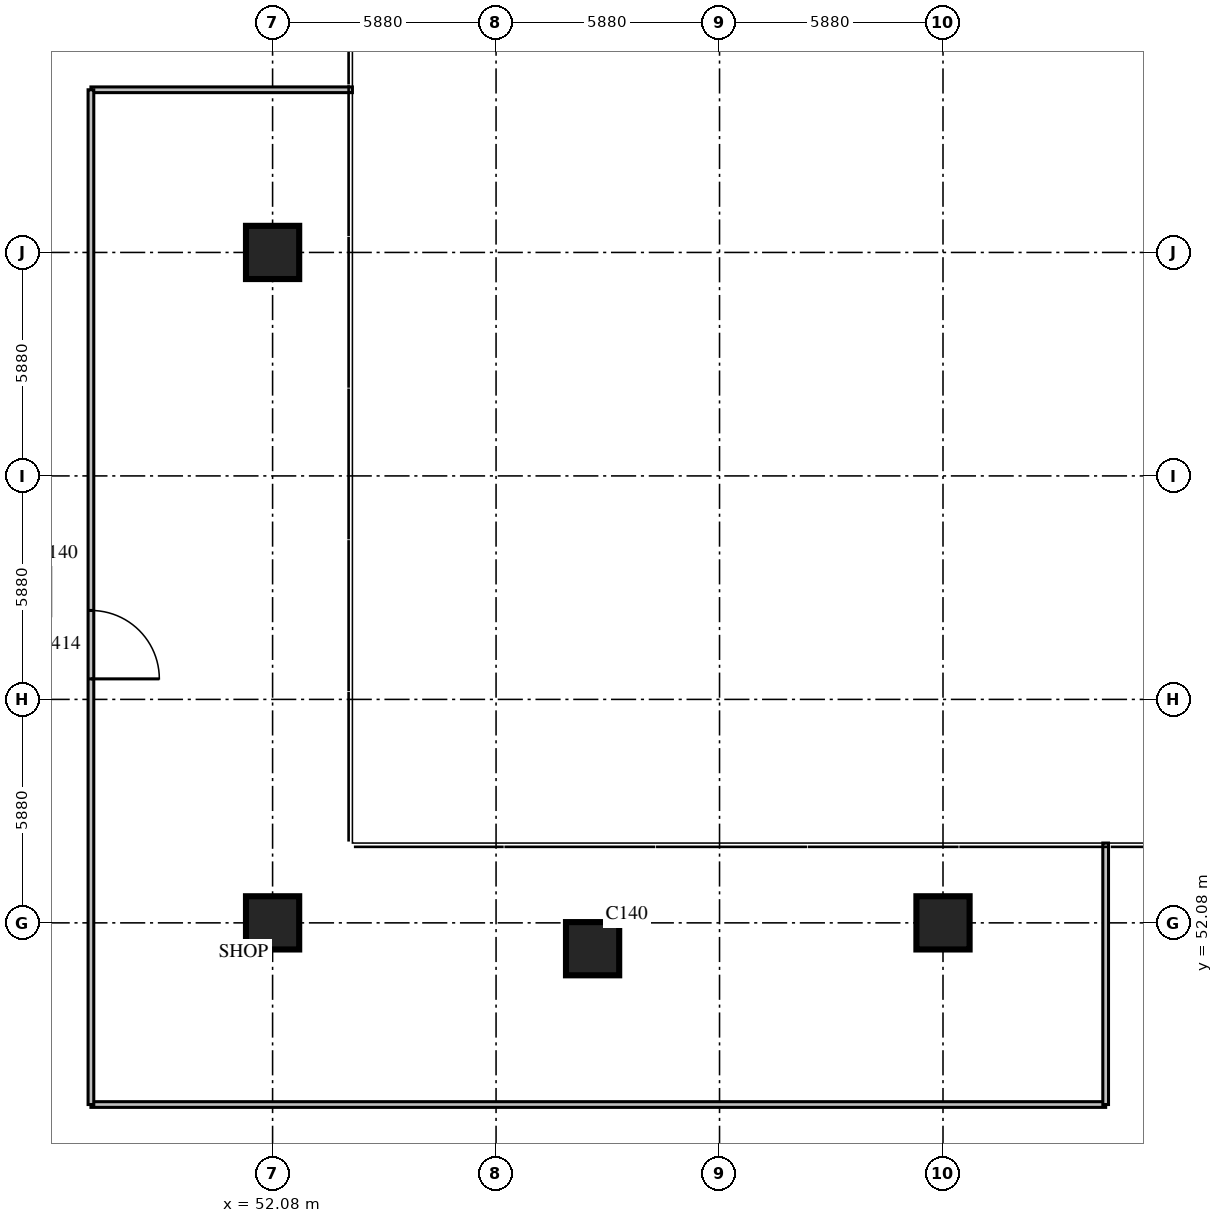
"""IFC4 building model, lengths in metres.
Left out: names, types, materials, properties, quantities, classifications, styles, units other than length and angle.
Written with IfcOpenShell. Run it as: python <this file> out.ifc"""

import sys

from ifc_helpers import new_model, si_unit, direction, frame, frame_2d, origin, origin_2d, place, context, subcontext, project, spatial, rectangle, extrude, source, transform, mapped, element, fill, save


model = new_model("IFC4")
c1 = context("Model", 3, precision=1e-05, world=origin(), true_north=direction((0.0, 1.0)))
c2 = subcontext(c1, "Body", "Model", "MODEL_VIEW")
j1 = project(units=[si_unit("LENGTHUNIT", "METRE"), si_unit("PLANEANGLEUNIT", "RADIAN")], contexts=[c1])
p1 = place(None, origin())
s1 = spatial("IfcSite", under=j1, at=p1, CompositionType="ELEMENT")
p2 = place(p1, origin())
s2 = spatial("IfcBuilding", under=s1, at=p2, CompositionType="ELEMENT")
p3 = place(p2, frame((0.0, 0.0, 7.5)))
s3 = spatial("IfcBuildingStorey", under=s2, at=p3, CompositionType="ELEMENT", Elevation=7.5)
m1 = source(origin(), c2, "Body", "SweptSolid", [
    extrude(rectangle(XDim=1.4, YDim=1.4, at=origin_2d()), origin(), (0.0, 0.0, 1.0), 5.4),
])
for number, where, z_axis, x_axis in (
    (1, (52.08, 52.08, 0.0), (0.0, 0.0, 1.0), (1.0, 0.0, 0.0)),
    (2, (52.08, 69.72, 0.0), (0.0, 0.0, 1.0), (1.0, 0.0, 0.0)),
    (3, (60.5, 51.4, 0.0), (0.0, 0.0, 1.0), (1.0, 0.0, 0.0)),
    (4, (69.72, 52.08, 0.0), (0.0, 0.0, 1.0), (1.0, 0.0, 0.0)),
):
    element("IfcColumn", number, at=place(p3, frame(where, z_axis=z_axis, x_axis=x_axis)), inside=s3, PredefinedType="COLUMN", context=c2, shape_type="MappedRepresentation", body=[
        mapped(m1, transform((0.0, 0.0, 0.0), scale=1.0)),
    ])
m2 = source(origin(), c2, "Body", "SweptSolid", [
    extrude(rectangle(XDim=26.7, YDim=0.15, at=frame_2d((13.35, 0.0))), origin(), (0.0, 0.0, 1.0), 4.8),
])
p4 = place(p3, frame((47.3, 47.3, 0.0), z_axis=(0.0, 0.0, 1.0), x_axis=(1.0, 0.0, 0.0)))
e5 = element("IfcWall", 5, at=p4, inside=s3, PredefinedType="PARTITIONING", context=c2, shape_type="MappedRepresentation", body=[
    mapped(m2, transform((0.0, 0.0, 0.0), scale=1.0)),
])
p5 = place(p3, frame((47.3, 74.0, 0.0), z_axis=(0.0, 0.0, 1.0), x_axis=(1.0, 0.0, 0.0)))
e6 = element("IfcWall", 6, at=p5, inside=s3, PredefinedType="PARTITIONING", context=c2, shape_type="SweptSolid", body=[
    extrude(rectangle(XDim=6.88, YDim=0.15, at=frame_2d((3.44, 0.0))), origin(), (0.0, 0.0, 1.0), 4.8),
])
p6 = place(p3, frame((47.3, 47.3, 0.0), z_axis=(0.0, 0.0, 1.0), x_axis=(0.0, 1.0, 0.0)))
e7 = element("IfcWall", 7, at=p6, inside=s3, PredefinedType="PARTITIONING", context=c2, shape_type="MappedRepresentation", body=[
    mapped(m2, transform((0.0, 0.0, 0.0), scale=1.0)),
])
m3 = source(origin(), c2, "Body", "SweptSolid", [
    extrude(rectangle(XDim=1.8, YDim=2.1, at=frame_2d((0.9, 1.05))), frame((0.0, 0.085, 0.0), z_axis=(0.0, -1.0, 0.0), x_axis=(1.0, 0.0, 0.0)), (0.0, 0.0, 1.0), 0.17),
])
p7 = place(p6, frame((11.2, 0.0, 0.0)))
e8 = element("IfcOpeningElement", 8, at=p7, cuts=e7, PredefinedType="OPENING", context=c2, shape_type="MappedRepresentation", body=[
    mapped(m3, transform((0.0, 0.0, 0.0), scale=1.0)),
])
m4 = source(origin(), c2, "Body", "SweptSolid", [
    extrude(rectangle(XDim=6.88, YDim=0.15, at=frame_2d((3.44, 0.0))), origin(), (0.0, 0.0, 1.0), 4.8),
])
p8 = place(p3, frame((74.0, 47.3, 0.0), z_axis=(0.0, 0.0, 1.0), x_axis=(0.0, 1.0, 0.0)))
e9 = element("IfcWall", 9, at=p8, inside=s3, PredefinedType="PARTITIONING", context=c2, shape_type="MappedRepresentation", body=[
    mapped(m4, transform((0.0, 0.0, 0.0), scale=1.0)),
])
m5 = source(origin(), c2, "Body", "SweptSolid", [
    extrude(rectangle(XDim=1.8, YDim=2.1, at=frame_2d((0.9, 1.05))), frame((0.0, 0.025, 0.0), z_axis=(0.0, -1.0, 0.0), x_axis=(1.0, 0.0, 0.0)), (0.0, 0.0, 1.0), 0.05),
])
p9 = place(p7, origin())
e10 = element("IfcDoor", 10, at=p9, inside=s3, OperationType="DOUBLE_DOOR_SINGLE_SWING", PredefinedType="DOOR", context=c2, shape_type="MappedRepresentation", body=[
    mapped(m5, transform((0.0, 0.0, 0.0), scale=1.0)),
])
fill(e8, e10)
save(model, sys.argv[1])
